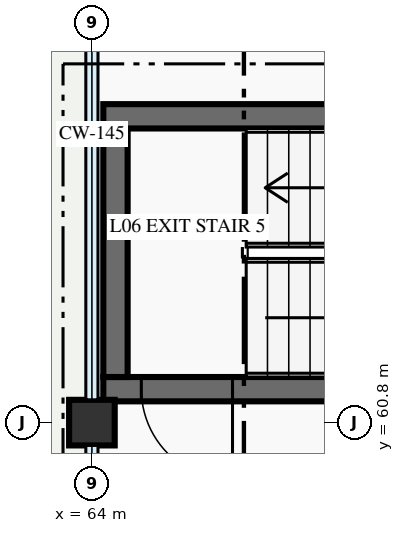
"""IFC4 building model, lengths in metres.
Left out: names, types, materials, properties, quantities, classifications, styles, units other than length and angle.
Written with IfcOpenShell. Run it as: python <this file> out.ifc"""

import sys

from ifc_helpers import new_model, si_unit, direction, frame, frame_2d, origin, origin_2d, place, context, subcontext, project, spatial, rectangle, extrude, element, fill, save


model = new_model("IFC4")
c1 = context("Model", 3, precision=1e-05, world=origin(), true_north=direction((0.0, 1.0)))
c2 = subcontext(c1, "Body", "Model", "MODEL_VIEW")
j1 = project(units=[si_unit("LENGTHUNIT", "METRE"), si_unit("PLANEANGLEUNIT", "RADIAN")], contexts=[c1])
p1 = place(None, origin())
s1 = spatial("IfcSite", under=j1, at=p1, CompositionType="ELEMENT")
p2 = place(p1, origin())
s2 = spatial("IfcBuilding", under=s1, at=p2, CompositionType="ELEMENT")
p3 = place(p2, frame((0.0, 0.0, 23.7)))
s3 = spatial("IfcBuildingStorey", under=s2, at=p3, CompositionType="ELEMENT", Elevation=23.7)
p4 = place(p3, frame((64.0, 60.8, 0.0), z_axis=(0.0, 0.0, 1.0), x_axis=(1.0, 0.0, 0.0)))
e1 = element("IfcColumn", 1, at=p4, inside=s3, PredefinedType="COLUMN", context=c2, shape_type="SweptSolid", body=[
    extrude(rectangle(XDim=0.6, YDim=0.6, at=origin_2d()), origin(), (0.0, 0.0, 1.0), 4.8),
])
p5 = place(p3, frame((71.85, 61.24, 0.0), z_axis=(0.0, 0.0, 1.0), x_axis=(-1.0, 0.0, 0.0)))
e2 = element("IfcWall", 2, at=p5, inside=s3, PredefinedType="SHEAR", context=c2, shape_type="SweptSolid", body=[
    extrude(rectangle(XDim=7.7, YDim=0.32, at=frame_2d((3.85, 0.0))), origin(), (0.0, 0.0, 1.0), 4.8),
])
p6 = place(p5, frame((6.0, 0.0, 0.0)))
e3 = element("IfcOpeningElement", 3, at=p6, cuts=e2, PredefinedType="OPENING", context=c2, shape_type="SweptSolid", body=[
    extrude(rectangle(XDim=1.2, YDim=2.2, at=frame_2d((0.6, 1.1))), frame((0.0, 0.17, 0.0), z_axis=(0.0, -1.0, 0.0), x_axis=(1.0, 0.0, 0.0)), (0.0, 0.0, 1.0), 0.34),
])
p7 = place(p3, frame((64.31, 61.4, 0.0), z_axis=(0.0, 0.0, 1.0), x_axis=(0.0, 1.0, 0.0)))
e4 = element("IfcWall", 4, at=p7, inside=s3, PredefinedType="SHEAR", context=c2, shape_type="SweptSolid", body=[
    extrude(rectangle(XDim=3.27, YDim=0.32, at=frame_2d((1.635, 0.0))), origin(), (0.0, 0.0, 1.0), 4.8),
])
p8 = place(p3, frame((64.15, 64.83, 0.0), z_axis=(0.0, 0.0, 1.0), x_axis=(1.0, 0.0, 0.0)))
e5 = element("IfcWall", 5, at=p8, inside=s3, PredefinedType="SHEAR", context=c2, shape_type="SweptSolid", body=[
    extrude(rectangle(XDim=7.7, YDim=0.32, at=frame_2d((3.85, 0.0))), origin(), (0.0, 0.0, 1.0), 4.8),
])
p9 = place(p6, origin())
e6 = element("IfcDoor", 6, at=p9, inside=s3, OperationType="SINGLE_SWING_LEFT", PredefinedType="DOOR", context=c2, shape_type="SweptSolid", body=[
    extrude(rectangle(XDim=1.2, YDim=2.2, at=frame_2d((0.6, 1.1))), frame((0.0, 0.025, 0.0), z_axis=(0.0, -1.0, 0.0), x_axis=(1.0, 0.0, 0.0)), (0.0, 0.0, 1.0), 0.05),
])
fill(e3, e6)
save(model, sys.argv[1])
